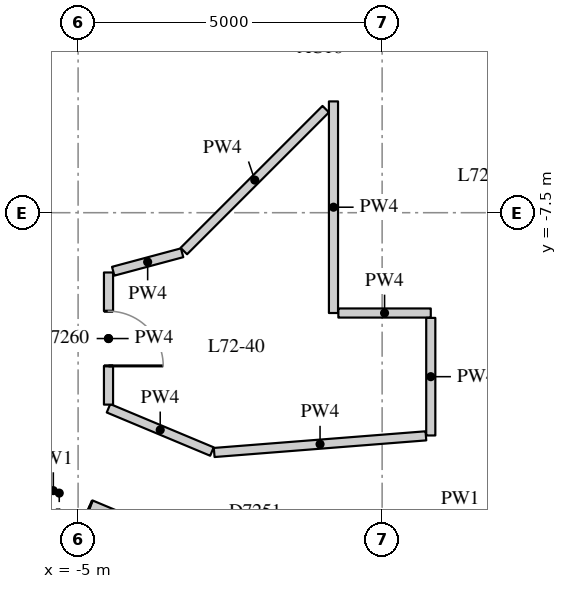
"""IFC4 building model, lengths in metres.
Left out: names, types, materials, properties, quantities, classifications, styles, units other than length and angle.
Written with IfcOpenShell. Run it as: python <this file> out.ifc"""

import sys

from ifc_helpers import new_model, si_unit, direction, frame, frame_2d, origin, place, context, subcontext, project, spatial, rectangle, extrude, element, fill, save


model = new_model("IFC4")
c1 = context("Model", 3, precision=1e-05, world=origin(), true_north=direction((0.0, 1.0)))
c2 = subcontext(c1, "Body", "Model", "MODEL_VIEW")
j1 = project(units=[si_unit("LENGTHUNIT", "METRE"), si_unit("PLANEANGLEUNIT", "RADIAN")], contexts=[c1])
p1 = place(None, origin())
s1 = spatial("IfcSite", under=j1, at=p1, CompositionType="ELEMENT")
p2 = place(p1, origin())
s2 = spatial("IfcBuilding", under=s1, at=p2, CompositionType="ELEMENT")
p3 = place(p2, frame((0.0, 0.0, 253.1)))
s3 = spatial("IfcBuildingStorey", under=s2, at=p3, CompositionType="ELEMENT", Elevation=253.1)
p4 = place(p3, frame((5.594, -12.392, 0.0), z_axis=(0.0, 0.0, 1.0), x_axis=(-0.996925151721, -0.078359695423, 0.0)))
e1 = element("IfcWall", 1, at=p4, inside=s3, PredefinedType="PARTITIONING", context=c2, shape_type="SweptSolid", body=[
    extrude(rectangle(XDim=8.643, YDim=0.2, at=frame_2d((4.321, 0.0))), origin(), (0.0, 0.0, 1.0), 3.02),
])
p5 = place(p4, frame((6.722, 0.0, 0.0)))
e2 = element("IfcOpeningElement", 2, at=p5, cuts=e1, PredefinedType="OPENING", context=c2, shape_type="SweptSolid", body=[
    extrude(rectangle(XDim=0.9, YDim=2.1, at=frame_2d((0.45, 1.05))), frame((0.0, 0.11, 0.0), z_axis=(0.0, -1.0, 0.0), x_axis=(1.0, 0.0, 0.0)), (0.0, 0.0, 1.0), 0.22),
])
p6 = place(p4, frame((2.309, 0.0, 0.0)))
e3 = element("IfcOpeningElement", 3, at=p6, cuts=e1, PredefinedType="OPENING", context=c2, shape_type="SweptSolid", body=[
    extrude(rectangle(XDim=1.1, YDim=2.1, at=frame_2d((0.55, 1.05))), frame((0.0, 0.11, 0.0), z_axis=(0.0, -1.0, 0.0), x_axis=(1.0, 0.0, 0.0)), (0.0, 0.0, 1.0), 0.22),
])
p7 = place(p3, frame((-3.115, -13.03, 0.0), z_axis=(0.0, 0.0, 1.0), x_axis=(-0.922510557065, 0.385971854031, 0.0)))
e4 = element("IfcWall", 4, at=p7, inside=s3, PredefinedType="PARTITIONING", context=c2, shape_type="SweptSolid", body=[
    extrude(rectangle(XDim=4.97, YDim=0.2, at=frame_2d((2.485, 0.0))), origin(), (0.0, 0.0, 1.0), 3.02),
])
p8 = place(p7, frame((1.829, 0.0, 0.0)))
e5 = element("IfcOpeningElement", 5, at=p8, cuts=e4, PredefinedType="OPENING", context=c2, shape_type="SweptSolid", body=[
    extrude(rectangle(XDim=1.1, YDim=2.1, at=frame_2d((0.55, 1.05))), frame((0.0, 0.11, 0.0), z_axis=(0.0, -1.0, 0.0), x_axis=(1.0, 0.0, 0.0)), (0.0, 0.0, 1.0), 0.22),
])
p9 = place(p3, frame((-0.8, -5.669, 0.0), z_axis=(0.0, 0.0, 1.0), x_axis=(0.0, -1.0, 0.0)))
e6 = element("IfcWall", 6, at=p9, inside=s3, PredefinedType="PARTITIONING", context=c2, shape_type="SweptSolid", body=[
    extrude(rectangle(XDim=3.48, YDim=0.15, at=frame_2d((1.74, 0.0))), origin(), (0.0, 0.0, 1.0), 3.02),
])
p10 = place(p3, frame((-0.72, -9.15, 0.0), z_axis=(0.0, 0.0, 1.0), x_axis=(1.0, 0.0, 0.0)))
e7 = element("IfcWall", 7, at=p10, inside=s3, PredefinedType="PARTITIONING", context=c2, shape_type="SweptSolid", body=[
    extrude(rectangle(XDim=1.52, YDim=0.15, at=frame_2d((0.76, 0.0))), origin(), (0.0, 0.0, 1.0), 3.02),
])
p11 = place(p3, frame((0.8, -9.23, 0.0), z_axis=(0.0, 0.0, 1.0), x_axis=(0.0, -1.0, 0.0)))
e8 = element("IfcWall", 8, at=p11, inside=s3, PredefinedType="PARTITIONING", context=c2, shape_type="SweptSolid", body=[
    extrude(rectangle(XDim=1.934, YDim=0.15, at=frame_2d((0.967, 0.0))), origin(), (0.0, 0.0, 1.0), 3.02),
])
p12 = place(p3, frame((0.72, -11.17, 0.0), z_axis=(0.0, 0.0, 1.0), x_axis=(-0.996919759383, -0.078428268828, 0.0)))
e9 = element("IfcWall", 9, at=p12, inside=s3, PredefinedType="PARTITIONING", context=c2, shape_type="SweptSolid", body=[
    extrude(rectangle(XDim=3.493, YDim=0.15, at=frame_2d((1.746, 0.0))), origin(), (0.0, 0.0, 1.0), 3.02),
])
p13 = place(p3, frame((-2.799, -11.428, 0.0), z_axis=(0.0, 0.0, 1.0), x_axis=(-0.922507880735, 0.385978250659, 0.0)))
e10 = element("IfcWall", 10, at=p13, inside=s3, PredefinedType="PARTITIONING", context=c2, shape_type="SweptSolid", body=[
    extrude(rectangle(XDim=1.844, YDim=0.15, at=frame_2d((0.922, 0.0))), origin(), (0.0, 0.0, 1.0), 3.02),
])
p14 = place(p3, frame((-4.5, -10.656, 0.0), z_axis=(0.0, 0.0, 1.0), x_axis=(0.0, 1.0, 0.0)))
e11 = element("IfcWall", 11, at=p14, inside=s3, PredefinedType="PARTITIONING", context=c2, shape_type="SweptSolid", body=[
    extrude(rectangle(XDim=2.173, YDim=0.15, at=frame_2d((1.087, 0.0))), origin(), (0.0, 0.0, 1.0), 3.02),
])
p15 = place(p14, frame((0.637, 0.0, 0.0)))
e12 = element("IfcOpeningElement", 12, at=p15, cuts=e11, PredefinedType="OPENING", context=c2, shape_type="SweptSolid", body=[
    extrude(rectangle(XDim=0.9, YDim=2.1, at=frame_2d((0.45, 1.05))), frame((0.0, 0.085, 0.0), z_axis=(0.0, -1.0, 0.0), x_axis=(1.0, 0.0, 0.0)), (0.0, 0.0, 1.0), 0.17),
])
p16 = place(p3, frame((-4.423, -8.463, 0.0), z_axis=(0.0, 0.0, 1.0), x_axis=(0.965916469839, 0.258853961327, 0.0)))
e13 = element("IfcWall", 13, at=p16, inside=s3, PredefinedType="PARTITIONING", context=c2, shape_type="SweptSolid", body=[
    extrude(rectangle(XDim=1.173, YDim=0.15, at=frame_2d((0.587, 0.0))), origin(), (0.0, 0.0, 1.0), 3.02),
])
p17 = place(p3, frame((-3.261, -8.131, 0.0), z_axis=(0.0, 0.0, 1.0), x_axis=(0.707106781187, 0.707106781187, 0.0)))
e14 = element("IfcWall", 14, at=p17, inside=s3, PredefinedType="PARTITIONING", context=c2, shape_type="SweptSolid", body=[
    extrude(rectangle(XDim=3.3, YDim=0.15, at=frame_2d((1.65, 0.0))), origin(), (0.0, 0.0, 1.0), 3.02),
])
p18 = place(p3, frame((-4.073, -3.927, 0.0), z_axis=(0.0, 0.0, 1.0), x_axis=(-0.923860025149, -0.382730523909, 0.0)))
e15 = element("IfcWall", 15, at=p18, inside=s3, PredefinedType="PARTITIONING", context=c2, shape_type="SweptSolid", body=[
    extrude(rectangle(XDim=4.251, YDim=0.1, at=frame_2d((2.125, 0.0))), origin(), (0.0, 0.0, 1.0), 3.02),
])
p19 = place(p8, origin())
e16 = element("IfcDoor", 16, at=p19, inside=s3, OperationType="SINGLE_SWING_LEFT", PredefinedType="DOOR", context=c2, shape_type="SweptSolid", body=[
    extrude(rectangle(XDim=1.1, YDim=2.1, at=frame_2d((0.55, 1.05))), frame((0.0, 0.025, 0.0), z_axis=(0.0, -1.0, 0.0), x_axis=(1.0, 0.0, 0.0)), (0.0, 0.0, 1.0), 0.05),
])
fill(e5, e16)
p20 = place(p15, origin())
e17 = element("IfcDoor", 17, at=p20, inside=s3, OperationType="SINGLE_SWING_RIGHT", PredefinedType="DOOR", context=c2, shape_type="SweptSolid", body=[
    extrude(rectangle(XDim=0.9, YDim=2.1, at=frame_2d((0.45, 1.05))), frame((0.0, 0.025, 0.0), z_axis=(0.0, -1.0, 0.0), x_axis=(1.0, 0.0, 0.0)), (0.0, 0.0, 1.0), 0.05),
])
fill(e12, e17)
save(model, sys.argv[1])
